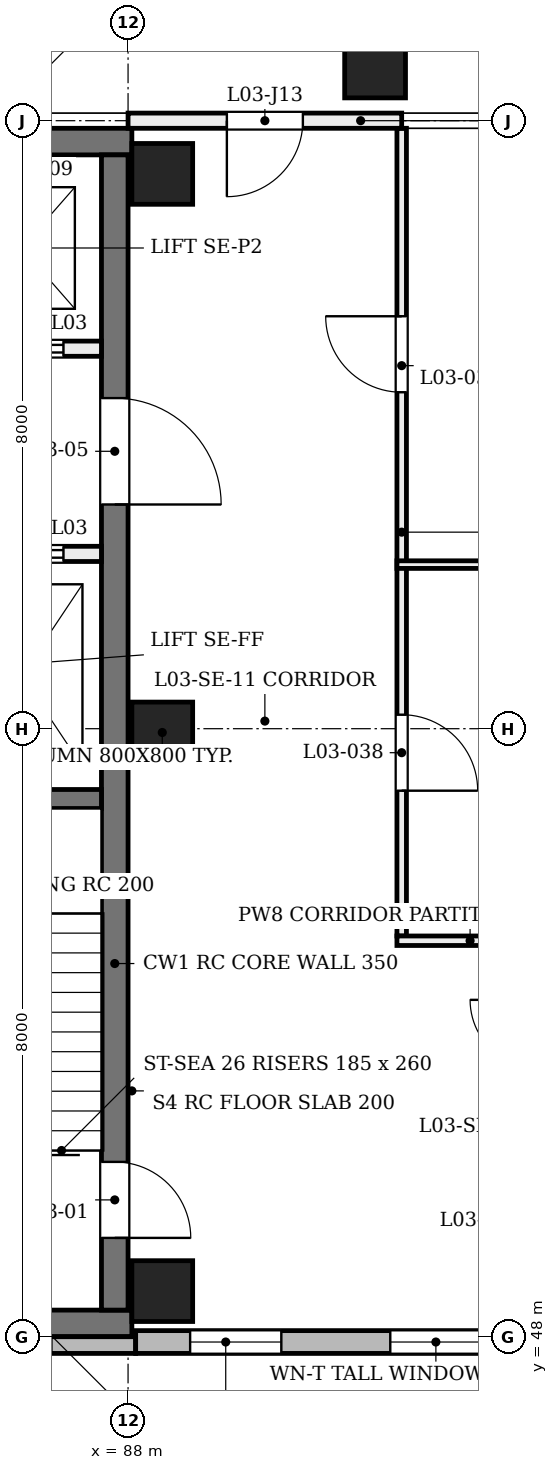
"""IFC4 building model, lengths in metres.
Left out: names, types, materials, properties, quantities, classifications, styles, units other than length and angle.
Written with IfcOpenShell. Run it as: python <this file> out.ifc"""

import sys

from ifc_helpers import new_model, si_unit, direction, frame, frame_2d, origin, origin_2d, place, context, subcontext, project, spatial, rectangle, extrude, element, fill, save


model = new_model("IFC4")
c1 = context("Model", 3, precision=1e-05, world=origin(), true_north=direction((0.0, 1.0)))
c2 = subcontext(c1, "Body", "Model", "MODEL_VIEW")
j1 = project(units=[si_unit("LENGTHUNIT", "METRE"), si_unit("PLANEANGLEUNIT", "RADIAN")], contexts=[c1])
p1 = place(None, origin())
s1 = spatial("IfcSite", under=j1, at=p1, CompositionType="ELEMENT")
p2 = place(p1, origin())
s2 = spatial("IfcBuilding", under=s1, at=p2, CompositionType="ELEMENT")
p3 = place(p2, frame((0.0, 0.0, 14.4)))
s3 = spatial("IfcBuildingStorey", under=s2, at=p3, CompositionType="ELEMENT", Elevation=14.4)
for number, where, z_axis, x_axis in (
    (1, (80.1, 48.175, 0.0), (0.0, 0.0, 1.0), (1.0, 0.0, 0.0)),
    (2, (80.1, 63.725, 0.0), (0.0, 0.0, 1.0), (1.0, 0.0, 0.0)),
):
    element("IfcWall", number, at=place(p3, frame(where, z_axis=z_axis, x_axis=x_axis)), inside=s3, PredefinedType="SHEAR", context=c2, shape_type="SweptSolid", body=[
        extrude(rectangle(XDim=7.95, YDim=0.35, at=frame_2d((3.975, 0.0))), origin(), (0.0, 0.0, 1.0), 4.58),
    ])
p4 = place(p3, frame((87.825, 48.35, 0.0), z_axis=(0.0, 0.0, 1.0), x_axis=(0.0, 1.0, 0.0)))
e3 = element("IfcWall", 3, at=p4, inside=s3, PredefinedType="SHEAR", context=c2, shape_type="SweptSolid", body=[
    extrude(rectangle(XDim=15.2, YDim=0.35, at=frame_2d((7.6, 0.0))), origin(), (0.0, 0.0, 1.0), 4.58),
])
p5 = place(p4, frame((0.95, 0.0, 0.0)))
e4 = element("IfcOpeningElement", 4, at=p5, cuts=e3, PredefinedType="OPENING", context=c2, shape_type="SweptSolid", body=[
    extrude(rectangle(XDim=1.0, YDim=2.1, at=frame_2d((0.5, 1.05))), frame((0.0, 0.185, 0.0), z_axis=(0.0, -1.0, 0.0), x_axis=(1.0, 0.0, 0.0)), (0.0, 0.0, 1.0), 0.37),
])
p6 = place(p4, frame((10.6, 0.0, 0.0)))
e5 = element("IfcOpeningElement", 5, at=p6, cuts=e3, PredefinedType="OPENING", context=c2, shape_type="SweptSolid", body=[
    extrude(rectangle(XDim=1.4, YDim=2.1, at=frame_2d((0.7, 1.05))), frame((0.0, 0.185, 0.0), z_axis=(0.0, -1.0, 0.0), x_axis=(1.0, 0.0, 0.0)), (0.0, 0.0, 1.0), 0.37),
])
for number, where, z_axis, x_axis in (
    (6, (88.45, 48.6, 0.0), (0.0, 0.0, 1.0), (1.0, 0.0, 0.0)),
    (7, (88.45, 55.95, 0.0), (0.0, 0.0, 1.0), (1.0, 0.0, 0.0)),
    (8, (88.45, 63.3, 0.0), (0.0, 0.0, 1.0), (1.0, 0.0, 0.0)),
):
    element("IfcColumn", number, at=place(p3, frame(where, z_axis=z_axis, x_axis=x_axis)), inside=s3, PredefinedType="COLUMN", context=c2, shape_type="SweptSolid", body=[
        extrude(rectangle(XDim=0.8, YDim=0.8, at=origin_2d()), origin(), (0.0, 0.0, 1.0), 4.8),
    ])
p7 = place(p3, frame((91.0, 64.7, 0.0), z_axis=(0.203952265704, 0.0, 0.978980833987), x_axis=(0.0, 1.0, 0.0)))
e9 = element("IfcColumn", 9, at=p7, inside=s3, PredefinedType="COLUMN", context=c2, shape_type="SweptSolid", body=[
    extrude(rectangle(XDim=0.8, YDim=0.8, at=origin_2d()), origin(), (0.0, 0.0, 1.0), 4.903),
])
p8 = place(p3, frame((79.9, 47.89, 0.0), z_axis=(0.0, 0.0, 1.0), x_axis=(1.0, 0.0, 0.0)))
e10 = element("IfcWall", 10, at=p8, inside=s3, PredefinedType="SOLIDWALL", context=c2, shape_type="SweptSolid", body=[
    extrude(rectangle(XDim=8.2, YDim=0.22, at=frame_2d((4.1, 0.0))), origin(), (0.0, 0.0, 1.0), 3.9),
])
p9 = place(p8, frame((1.308, 0.0, 0.9)))
e11 = element("IfcOpeningElement", 11, at=p9, cuts=e10, PredefinedType="OPENING", context=c2, shape_type="SweptSolid", body=[
    extrude(rectangle(XDim=0.45, YDim=2.6, at=frame_2d((0.225, 1.3))), frame((0.0, 0.12, 0.0), z_axis=(0.0, -1.0, 0.0), x_axis=(1.0, 0.0, 0.0)), (0.0, 0.0, 1.0), 0.24),
])
p10 = place(p8, frame((3.975, 0.0, 0.9)))
e12 = element("IfcOpeningElement", 12, at=p10, cuts=e10, PredefinedType="OPENING", context=c2, shape_type="SweptSolid", body=[
    extrude(rectangle(XDim=0.45, YDim=2.6, at=frame_2d((0.225, 1.3))), frame((0.0, 0.12, 0.0), z_axis=(0.0, -1.0, 0.0), x_axis=(1.0, 0.0, 0.0)), (0.0, 0.0, 1.0), 0.24),
])
p11 = place(p8, frame((6.642, 0.0, 0.9)))
e13 = element("IfcOpeningElement", 13, at=p11, cuts=e10, PredefinedType="OPENING", context=c2, shape_type="SweptSolid", body=[
    extrude(rectangle(XDim=0.45, YDim=2.6, at=frame_2d((0.225, 1.3))), frame((0.0, 0.12, 0.0), z_axis=(0.0, -1.0, 0.0), x_axis=(1.0, 0.0, 0.0)), (0.0, 0.0, 1.0), 0.24),
])
p12 = place(p3, frame((88.1, 47.93, 0.0), z_axis=(0.0, 0.0, 1.0), x_axis=(1.0, 0.0, 0.0)))
e14 = element("IfcWall", 14, at=p12, inside=s3, PredefinedType="SOLIDWALL", context=c2, shape_type="SweptSolid", body=[
    extrude(rectangle(XDim=7.9, YDim=0.3, at=frame_2d((3.95, 0.0))), origin(), (0.0, 0.0, 1.0), 3.9),
])
p13 = place(p12, frame((0.717, 0.0, 0.75)))
e15 = element("IfcOpeningElement", 15, at=p13, cuts=e14, PredefinedType="OPENING", context=c2, shape_type="SweptSolid", body=[
    extrude(rectangle(XDim=1.2, YDim=3.1, at=frame_2d((0.6, 1.55))), frame((0.0, 0.16, 0.0), z_axis=(0.0, -1.0, 0.0), x_axis=(1.0, 0.0, 0.0)), (0.0, 0.0, 1.0), 0.32),
])
p14 = place(p12, frame((3.35, 0.0, 0.75)))
e16 = element("IfcOpeningElement", 16, at=p14, cuts=e14, PredefinedType="OPENING", context=c2, shape_type="SweptSolid", body=[
    extrude(rectangle(XDim=1.2, YDim=3.1, at=frame_2d((0.6, 1.55))), frame((0.0, 0.16, 0.0), z_axis=(0.0, -1.0, 0.0), x_axis=(1.0, 0.0, 0.0)), (0.0, 0.0, 1.0), 0.32),
])
p15 = place(p12, frame((5.983, 0.0, 0.75)))
e17 = element("IfcOpeningElement", 17, at=p15, cuts=e14, PredefinedType="OPENING", context=c2, shape_type="SweptSolid", body=[
    extrude(rectangle(XDim=1.2, YDim=3.1, at=frame_2d((0.6, 1.55))), frame((0.0, 0.16, 0.0), z_axis=(0.0, -1.0, 0.0), x_axis=(1.0, 0.0, 0.0)), (0.0, 0.0, 1.0), 0.32),
])
p16 = place(p3, frame((87.65, 55.075, 0.0), z_axis=(0.0, 0.0, 1.0), x_axis=(-1.0, 0.0, 0.0)))
e18 = element("IfcWall", 18, at=p16, inside=s3, PredefinedType="SOLIDWALL", context=c2, shape_type="SweptSolid", body=[
    extrude(rectangle(XDim=3.1, YDim=0.25, at=frame_2d((1.55, 0.0))), origin(), (0.0, 0.0, 1.0), 4.55),
])
p17 = place(p3, frame((87.65, 58.3, 0.0), z_axis=(0.0, 0.0, 1.0), x_axis=(-1.0, 0.0, 0.0)))
e19 = element("IfcWall", 19, at=p17, inside=s3, PredefinedType="SOLIDWALL", context=c2, shape_type="SweptSolid", body=[
    extrude(rectangle(XDim=7.2, YDim=0.2, at=frame_2d((3.6, 0.0))), origin(), (0.0, 0.0, 1.0), 4.55),
])
p18 = place(p17, frame((0.5, 0.0, 0.0)))
e20 = element("IfcOpeningElement", 20, at=p18, cuts=e19, PredefinedType="OPENING", context=c2, shape_type="SweptSolid", body=[
    extrude(rectangle(XDim=1.1, YDim=2.1, at=frame_2d((0.55, 1.05))), frame((0.0, 0.11, 0.0), z_axis=(0.0, -1.0, 0.0), x_axis=(1.0, 0.0, 0.0)), (0.0, 0.0, 1.0), 0.22),
])
p19 = place(p17, frame((5.6, 0.0, 0.0)))
e21 = element("IfcOpeningElement", 21, at=p19, cuts=e19, PredefinedType="OPENING", context=c2, shape_type="SweptSolid", body=[
    extrude(rectangle(XDim=1.1, YDim=2.1, at=frame_2d((0.55, 1.05))), frame((0.0, 0.11, 0.0), z_axis=(0.0, -1.0, 0.0), x_axis=(1.0, 0.0, 0.0)), (0.0, 0.0, 1.0), 0.22),
])
p20 = place(p17, frame((3.1, 0.0, 0.0)))
e22 = element("IfcOpeningElement", 22, at=p20, cuts=e19, PredefinedType="OPENING", context=c2, shape_type="SweptSolid", body=[
    extrude(rectangle(XDim=1.0, YDim=2.1, at=frame_2d((0.5, 1.05))), frame((0.0, 0.11, 0.0), z_axis=(0.0, -1.0, 0.0), x_axis=(1.0, 0.0, 0.0)), (0.0, 0.0, 1.0), 0.22),
])
p21 = place(p3, frame((87.65, 61.0, 0.0), z_axis=(0.0, 0.0, 1.0), x_axis=(-1.0, 0.0, 0.0)))
e23 = element("IfcWall", 23, at=p21, inside=s3, PredefinedType="SOLIDWALL", context=c2, shape_type="SweptSolid", body=[
    extrude(rectangle(XDim=7.2, YDim=0.2, at=frame_2d((3.6, 0.0))), origin(), (0.0, 0.0, 1.0), 4.55),
])
p22 = place(p21, frame((0.5, 0.0, 0.0)))
e24 = element("IfcOpeningElement", 24, at=p22, cuts=e23, PredefinedType="OPENING", context=c2, shape_type="SweptSolid", body=[
    extrude(rectangle(XDim=1.1, YDim=2.1, at=frame_2d((0.55, 1.05))), frame((0.0, 0.11, 0.0), z_axis=(0.0, -1.0, 0.0), x_axis=(1.0, 0.0, 0.0)), (0.0, 0.0, 1.0), 0.22),
])
p23 = place(p21, frame((5.6, 0.0, 0.0)))
e25 = element("IfcOpeningElement", 25, at=p23, cuts=e23, PredefinedType="OPENING", context=c2, shape_type="SweptSolid", body=[
    extrude(rectangle(XDim=1.1, YDim=2.1, at=frame_2d((0.55, 1.05))), frame((0.0, 0.11, 0.0), z_axis=(0.0, -1.0, 0.0), x_axis=(1.0, 0.0, 0.0)), (0.0, 0.0, 1.0), 0.22),
])
p24 = place(p21, frame((3.1, 0.0, 0.0)))
e26 = element("IfcOpeningElement", 26, at=p24, cuts=e23, PredefinedType="OPENING", context=c2, shape_type="SweptSolid", body=[
    extrude(rectangle(XDim=1.0, YDim=2.1, at=frame_2d((0.5, 1.05))), frame((0.0, 0.11, 0.0), z_axis=(0.0, -1.0, 0.0), x_axis=(1.0, 0.0, 0.0)), (0.0, 0.0, 1.0), 0.22),
])
p25 = place(p3, frame((91.6, 53.272, 0.0), z_axis=(0.0, 0.0, 1.0), x_axis=(0.0, 1.0, 0.0)))
e27 = element("IfcWall", 27, at=p25, inside=s3, PredefinedType="PARTITIONING", context=c2, shape_type="SweptSolid", body=[
    extrude(rectangle(XDim=10.628, YDim=0.125, at=frame_2d((5.314, 0.0))), origin(), (0.0, 0.0, 1.0), 3.88),
])
p26 = place(p25, frame((1.912, 0.0, 0.0)))
e28 = element("IfcOpeningElement", 28, at=p26, cuts=e27, PredefinedType="OPENING", context=c2, shape_type="SweptSolid", body=[
    extrude(rectangle(XDim=1.0, YDim=2.1, at=frame_2d((0.5, 1.05))), frame((0.0, 0.073, 0.0), z_axis=(0.0, -1.0, 0.0), x_axis=(1.0, 0.0, 0.0)), (0.0, 0.0, 1.0), 0.145),
])
p27 = place(p25, frame((7.155, 0.0, 0.0)))
e29 = element("IfcOpeningElement", 29, at=p27, cuts=e27, PredefinedType="OPENING", context=c2, shape_type="SweptSolid", body=[
    extrude(rectangle(XDim=1.0, YDim=2.1, at=frame_2d((0.5, 1.05))), frame((0.0, 0.073, 0.0), z_axis=(0.0, -1.0, 0.0), x_axis=(1.0, 0.0, 0.0)), (0.0, 0.0, 1.0), 0.145),
])
p28 = place(p3, frame((91.538, 53.21, 0.0), z_axis=(0.0, 0.0, 1.0), x_axis=(1.0, 0.0, 0.0)))
e30 = element("IfcWall", 30, at=p28, inside=s3, PredefinedType="PARTITIONING", context=c2, shape_type="SweptSolid", body=[
    extrude(rectangle(XDim=1.925, YDim=0.125, at=frame_2d((0.962, 0.0))), origin(), (0.0, 0.0, 1.0), 4.56),
])
p29 = place(p3, frame((91.538, 58.159, 0.0), z_axis=(0.0, 0.0, 1.0), x_axis=(1.0, 0.0, 0.0)))
e31 = element("IfcWall", 31, at=p29, inside=s3, PredefinedType="PARTITIONING", context=c2, shape_type="SweptSolid", body=[
    extrude(rectangle(XDim=4.382, YDim=0.1, at=frame_2d((2.191, 0.0))), origin(), (0.0, 0.0, 1.0), 3.88),
])
p30 = place(p3, frame((88.0, 64.0, 0.0), z_axis=(0.0, 0.0, 1.0), x_axis=(1.0, 0.0, 0.0)))
e32 = element("IfcWall", 32, at=p30, inside=s3, PredefinedType="PARTITIONING", context=c2, shape_type="SweptSolid", body=[
    extrude(rectangle(XDim=3.6, YDim=0.2, at=frame_2d((1.8, 0.0))), origin(), (0.0, 0.0, 1.0), 3.88),
])
p31 = place(p30, frame((1.3, 0.0, 0.0)))
e33 = element("IfcOpeningElement", 33, at=p31, cuts=e32, PredefinedType="OPENING", context=c2, shape_type="SweptSolid", body=[
    extrude(rectangle(XDim=1.0, YDim=2.1, at=frame_2d((0.5, 1.05))), frame((0.0, 0.11, 0.0), z_axis=(0.0, -1.0, 0.0), x_axis=(1.0, 0.0, 0.0)), (0.0, 0.0, 1.0), 0.22),
])
p32 = place(p13, origin())
e34 = element("IfcWindow", 34, at=p32, inside=s3, PartitioningType="SINGLE_PANEL", PredefinedType="WINDOW", context=c2, shape_type="SweptSolid", body=[
    extrude(rectangle(XDim=1.2, YDim=3.1, at=frame_2d((0.6, 1.55))), frame((0.0, 0.03, 0.0), z_axis=(0.0, -1.0, 0.0), x_axis=(1.0, 0.0, 0.0)), (0.0, 0.0, 1.0), 0.06),
])
fill(e15, e34)
p33 = place(p14, origin())
e35 = element("IfcWindow", 35, at=p33, inside=s3, PartitioningType="SINGLE_PANEL", PredefinedType="WINDOW", context=c2, shape_type="SweptSolid", body=[
    extrude(rectangle(XDim=1.2, YDim=3.1, at=frame_2d((0.6, 1.55))), frame((0.0, 0.03, 0.0), z_axis=(0.0, -1.0, 0.0), x_axis=(1.0, 0.0, 0.0)), (0.0, 0.0, 1.0), 0.06),
])
fill(e16, e35)
p34 = place(p5, frame((1.0, 0.0, 0.0), z_axis=(0.0, 0.0, 1.0), x_axis=(-1.0, 0.0, 0.0)))
e36 = element("IfcDoor", 36, at=p34, inside=s3, OperationType="SINGLE_SWING_LEFT", PredefinedType="DOOR", context=c2, shape_type="SweptSolid", body=[
    extrude(rectangle(XDim=1.0, YDim=2.1, at=frame_2d((0.5, 1.05))), frame((0.0, 0.025, 0.0), z_axis=(0.0, -1.0, 0.0), x_axis=(1.0, 0.0, 0.0)), (0.0, 0.0, 1.0), 0.05),
])
fill(e4, e36)
p35 = place(p18, frame((1.1, 0.0, 0.0), z_axis=(0.0, 0.0, 1.0), x_axis=(-1.0, 0.0, 0.0)))
e37 = element("IfcDoor", 37, at=p35, inside=s3, OperationType="DOUBLE_DOOR_SLIDING", PredefinedType="DOOR", context=c2, shape_type="SweptSolid", body=[
    extrude(rectangle(XDim=1.1, YDim=2.1, at=frame_2d((0.55, 1.05))), frame((0.0, 0.025, 0.0), z_axis=(0.0, -1.0, 0.0), x_axis=(1.0, 0.0, 0.0)), (0.0, 0.0, 1.0), 0.05),
])
fill(e20, e37)
p36 = place(p22, origin())
e38 = element("IfcDoor", 38, at=p36, inside=s3, OperationType="DOUBLE_DOOR_SLIDING", PredefinedType="DOOR", context=c2, shape_type="SweptSolid", body=[
    extrude(rectangle(XDim=1.1, YDim=2.1, at=frame_2d((0.55, 1.05))), frame((0.0, 0.025, 0.0), z_axis=(0.0, -1.0, 0.0), x_axis=(1.0, 0.0, 0.0)), (0.0, 0.0, 1.0), 0.05),
])
fill(e24, e38)
p37 = place(p6, frame((1.4, 0.0, 0.0), z_axis=(0.0, 0.0, 1.0), x_axis=(-1.0, 0.0, 0.0)))
e39 = element("IfcDoor", 39, at=p37, inside=s3, OperationType="SINGLE_SWING_LEFT", PredefinedType="DOOR", context=c2, shape_type="SweptSolid", body=[
    extrude(rectangle(XDim=1.4, YDim=2.1, at=frame_2d((0.7, 1.05))), frame((0.0, 0.025, 0.0), z_axis=(0.0, -1.0, 0.0), x_axis=(1.0, 0.0, 0.0)), (0.0, 0.0, 1.0), 0.05),
])
fill(e5, e39)
p38 = place(p26, frame((1.0, 0.0, 0.0), z_axis=(0.0, 0.0, 1.0), x_axis=(-1.0, 0.0, 0.0)))
e40 = element("IfcDoor", 40, at=p38, inside=s3, OperationType="SINGLE_SWING_LEFT", PredefinedType="DOOR", context=c2, shape_type="SweptSolid", body=[
    extrude(rectangle(XDim=1.0, YDim=2.1, at=frame_2d((0.5, 1.05))), frame((0.0, 0.025, 0.0), z_axis=(0.0, -1.0, 0.0), x_axis=(1.0, 0.0, 0.0)), (0.0, 0.0, 1.0), 0.05),
])
fill(e28, e40)
p39 = place(p27, frame((1.0, 0.0, 0.0), z_axis=(0.0, 0.0, 1.0), x_axis=(-1.0, 0.0, 0.0)))
e41 = element("IfcDoor", 41, at=p39, inside=s3, OperationType="SINGLE_SWING_RIGHT", PredefinedType="DOOR", context=c2, shape_type="SweptSolid", body=[
    extrude(rectangle(XDim=1.0, YDim=2.1, at=frame_2d((0.5, 1.05))), frame((0.0, 0.025, 0.0), z_axis=(0.0, -1.0, 0.0), x_axis=(1.0, 0.0, 0.0)), (0.0, 0.0, 1.0), 0.05),
])
fill(e29, e41)
p40 = place(p31, frame((1.0, 0.0, 0.0), z_axis=(0.0, 0.0, 1.0), x_axis=(-1.0, 0.0, 0.0)))
e42 = element("IfcDoor", 42, at=p40, inside=s3, OperationType="SINGLE_SWING_LEFT", PredefinedType="DOOR", context=c2, shape_type="SweptSolid", body=[
    extrude(rectangle(XDim=1.0, YDim=2.1, at=frame_2d((0.5, 1.05))), frame((0.0, 0.025, 0.0), z_axis=(0.0, -1.0, 0.0), x_axis=(1.0, 0.0, 0.0)), (0.0, 0.0, 1.0), 0.05),
])
fill(e33, e42)
save(model, sys.argv[1])
